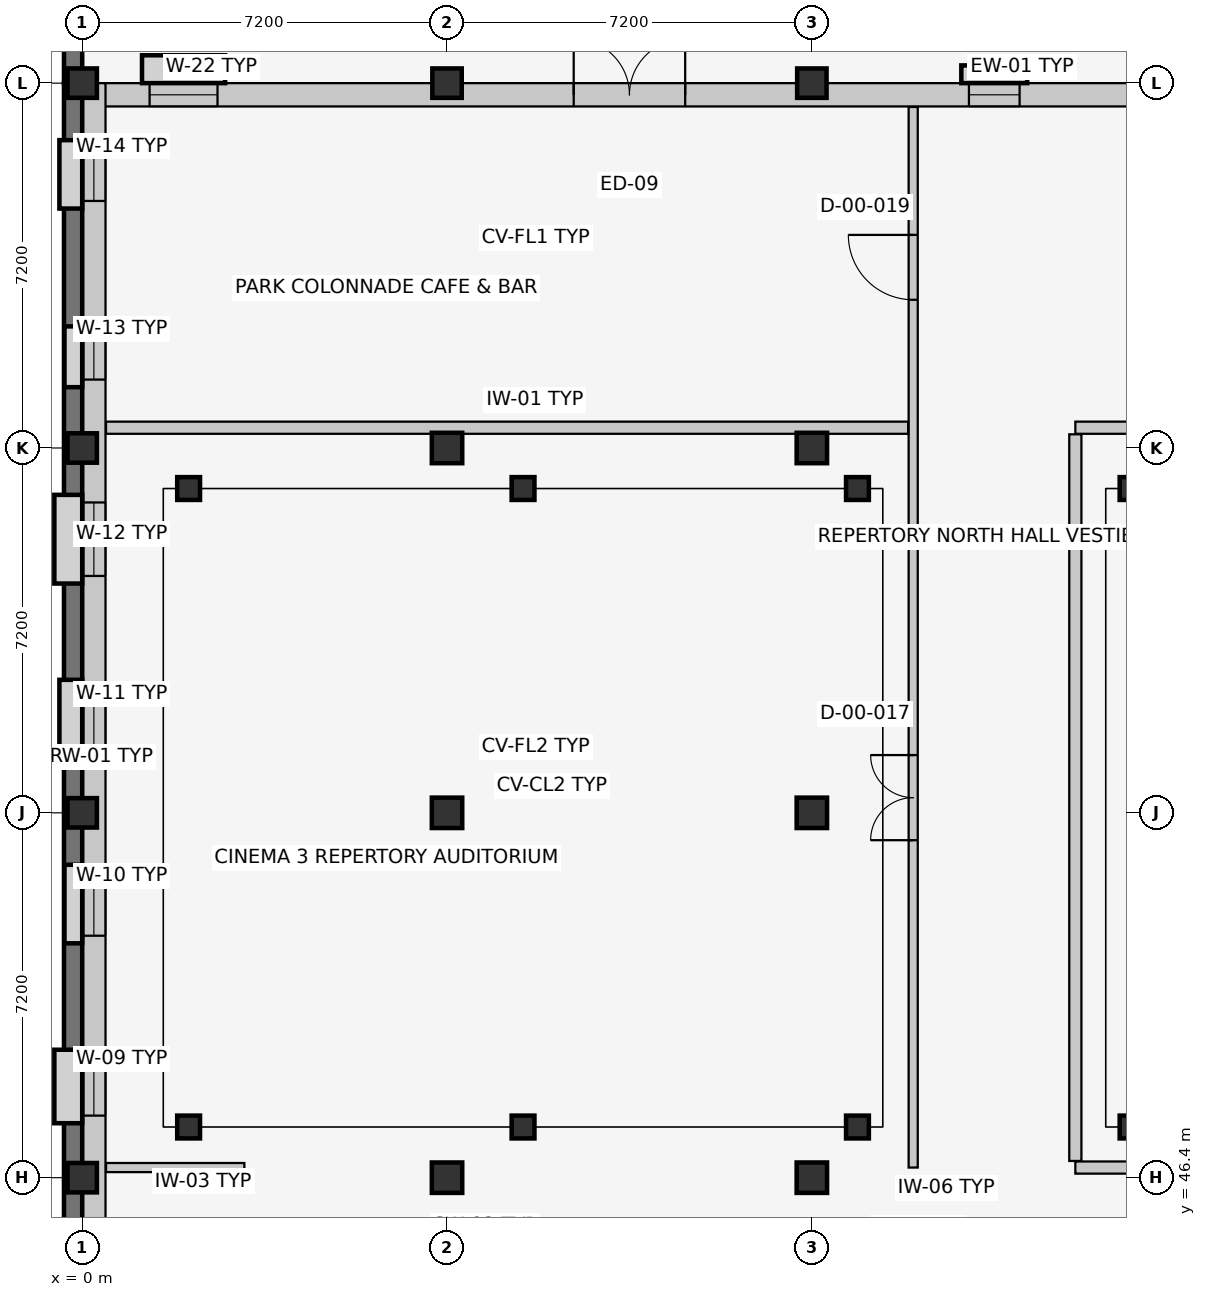
"""IFC4 building model, lengths in metres.
Left out: names, types, materials, properties, quantities, classifications, styles, units other than length and angle.
Written with IfcOpenShell. Run it as: python <this file> out.ifc"""

import sys

from ifc_helpers import new_model, si_unit, direction, frame, frame_2d, origin, origin_2d, place, context, subcontext, project, spatial, rectangle, extrude, element, fill, save


model = new_model("IFC4")
c1 = context("Model", 3, precision=1e-05, world=origin(), true_north=direction((0.0, 1.0)))
c2 = subcontext(c1, "Body", "Model", "MODEL_VIEW")
j1 = project(units=[si_unit("LENGTHUNIT", "METRE"), si_unit("PLANEANGLEUNIT", "RADIAN")], contexts=[c1])
p1 = place(None, origin())
s1 = spatial("IfcSite", under=j1, at=p1, CompositionType="ELEMENT")
p2 = place(p1, origin())
s2 = spatial("IfcBuilding", under=s1, at=p2, CompositionType="ELEMENT")
p3 = place(p2, origin())
s3 = spatial("IfcBuildingStorey", under=s2, at=p3, CompositionType="ELEMENT", Elevation=0.0)
for number, where, z_axis, x_axis in (
    (1, (0.0, 46.4, 0.0), (0.0, 0.0, 1.0), (1.0, 0.0, 0.0)),
    (2, (0.0, 53.6, 0.0), (0.0, 0.0, 1.0), (1.0, 0.0, 0.0)),
    (3, (0.0, 60.8, 0.0), (0.0, 0.0, 1.0), (1.0, 0.0, 0.0)),
    (4, (0.0, 68.0, 0.0), (0.0, 0.0, 1.0), (1.0, 0.0, 0.0)),
):
    element("IfcColumn", number, at=place(p3, frame(where, z_axis=z_axis, x_axis=x_axis)), inside=s3, PredefinedType="COLUMN", context=c2, shape_type="SweptSolid", body=[
        extrude(rectangle(XDim=0.58, YDim=0.58, at=origin_2d()), origin(), (0.0, 0.0, 1.0), 5.4),
    ])
for number, where, z_axis, x_axis in (
    (5, (7.2, 46.4, 0.0), (0.0, 0.0, 1.0), (1.0, 0.0, 0.0)),
    (6, (7.2, 53.6, 0.0), (0.0, 0.0, 1.0), (1.0, 0.0, 0.0)),
    (7, (7.2, 60.8, 0.0), (0.0, 0.0, 1.0), (1.0, 0.0, 0.0)),
):
    element("IfcColumn", number, at=place(p3, frame(where, z_axis=z_axis, x_axis=x_axis)), inside=s3, PredefinedType="COLUMN", context=c2, shape_type="SweptSolid", body=[
        extrude(rectangle(XDim=0.6, YDim=0.6, at=origin_2d()), origin(), (0.0, 0.0, 1.0), 5.4),
    ])
p4 = place(p3, frame((7.2, 68.0, 0.0), z_axis=(0.0, 0.0, 1.0), x_axis=(1.0, 0.0, 0.0)))
e8 = element("IfcColumn", 8, at=p4, inside=s3, PredefinedType="COLUMN", context=c2, shape_type="SweptSolid", body=[
    extrude(rectangle(XDim=0.58, YDim=0.58, at=origin_2d()), origin(), (0.0, 0.0, 1.0), 5.4),
])
for number, where, z_axis, x_axis in (
    (9, (14.4, 46.4, 0.0), (0.0, 0.0, 1.0), (1.0, 0.0, 0.0)),
    (10, (14.4, 53.6, 0.0), (0.0, 0.0, 1.0), (1.0, 0.0, 0.0)),
    (11, (14.4, 60.8, 0.0), (0.0, 0.0, 1.0), (1.0, 0.0, 0.0)),
):
    element("IfcColumn", number, at=place(p3, frame(where, z_axis=z_axis, x_axis=x_axis)), inside=s3, PredefinedType="COLUMN", context=c2, shape_type="SweptSolid", body=[
        extrude(rectangle(XDim=0.6, YDim=0.6, at=origin_2d()), origin(), (0.0, 0.0, 1.0), 5.4),
    ])
p5 = place(p3, frame((14.4, 68.0, 0.0), z_axis=(0.0, 0.0, 1.0), x_axis=(1.0, 0.0, 0.0)))
e12 = element("IfcColumn", 12, at=p5, inside=s3, PredefinedType="COLUMN", context=c2, shape_type="SweptSolid", body=[
    extrude(rectangle(XDim=0.58, YDim=0.58, at=origin_2d()), origin(), (0.0, 0.0, 1.0), 5.4),
])
p6 = place(p3, frame((2.1, 47.4, -0.55), z_axis=(0.0, 0.0, 1.0), x_axis=(1.0, 0.0, 0.0)))
e13 = element("IfcColumn", 13, at=p6, inside=s3, PredefinedType="COLUMN", context=c2, shape_type="SweptSolid", body=[
    extrude(rectangle(XDim=0.45, YDim=0.45, at=origin_2d()), origin(), (0.0, 0.0, 1.0), 0.955),
])
p7 = place(p3, frame((2.1, 60.0, -0.55), z_axis=(0.0, 0.0, 1.0), x_axis=(1.0, 0.0, 0.0)))
e14 = element("IfcColumn", 14, at=p7, inside=s3, PredefinedType="COLUMN", context=c2, shape_type="SweptSolid", body=[
    extrude(rectangle(XDim=0.45, YDim=0.45, at=origin_2d()), origin(), (0.0, 0.0, 1.0), 3.625),
])
p8 = place(p3, frame((8.7, 47.4, -0.55), z_axis=(0.0, 0.0, 1.0), x_axis=(1.0, 0.0, 0.0)))
e15 = element("IfcColumn", 15, at=p8, inside=s3, PredefinedType="COLUMN", context=c2, shape_type="SweptSolid", body=[
    extrude(rectangle(XDim=0.45, YDim=0.45, at=origin_2d()), origin(), (0.0, 0.0, 1.0), 0.955),
])
p9 = place(p3, frame((8.7, 60.0, -0.55), z_axis=(0.0, 0.0, 1.0), x_axis=(1.0, 0.0, 0.0)))
e16 = element("IfcColumn", 16, at=p9, inside=s3, PredefinedType="COLUMN", context=c2, shape_type="SweptSolid", body=[
    extrude(rectangle(XDim=0.45, YDim=0.45, at=origin_2d()), origin(), (0.0, 0.0, 1.0), 3.625),
])
p10 = place(p3, frame((15.3, 47.4, -0.55), z_axis=(0.0, 0.0, 1.0), x_axis=(1.0, 0.0, 0.0)))
e17 = element("IfcColumn", 17, at=p10, inside=s3, PredefinedType="COLUMN", context=c2, shape_type="SweptSolid", body=[
    extrude(rectangle(XDim=0.45, YDim=0.45, at=origin_2d()), origin(), (0.0, 0.0, 1.0), 0.955),
])
p11 = place(p3, frame((15.3, 60.0, -0.55), z_axis=(0.0, 0.0, 1.0), x_axis=(1.0, 0.0, 0.0)))
e18 = element("IfcColumn", 18, at=p11, inside=s3, PredefinedType="COLUMN", context=c2, shape_type="SweptSolid", body=[
    extrude(rectangle(XDim=0.45, YDim=0.45, at=origin_2d()), origin(), (0.0, 0.0, 1.0), 3.625),
])
p12 = place(p3, frame((20.7, 47.4, -0.55), z_axis=(0.0, 0.0, 1.0), x_axis=(1.0, 0.0, 0.0)))
e19 = element("IfcColumn", 19, at=p12, inside=s3, PredefinedType="COLUMN", context=c2, shape_type="SweptSolid", body=[
    extrude(rectangle(XDim=0.45, YDim=0.45, at=origin_2d()), origin(), (0.0, 0.0, 1.0), 0.975),
])
p13 = place(p3, frame((20.7, 60.0, -0.55), z_axis=(0.0, 0.0, 1.0), x_axis=(1.0, 0.0, 0.0)))
e20 = element("IfcColumn", 20, at=p13, inside=s3, PredefinedType="COLUMN", context=c2, shape_type="SweptSolid", body=[
    extrude(rectangle(XDim=0.45, YDim=0.45, at=origin_2d()), origin(), (0.0, 0.0, 1.0), 3.645),
])
p14 = place(p3, frame((0.0, 67.77, 0.0), z_axis=(0.0, 0.0, 1.0), x_axis=(1.0, 0.0, 0.0)))
e21 = element("IfcWall", 21, at=p14, inside=s3, PredefinedType="SOLIDWALL", context=c2, shape_type="SweptSolid", body=[
    extrude(rectangle(XDim=36.0, YDim=0.46, at=frame_2d((18.0, 0.0))), origin(), (0.0, 0.0, 1.0), 4.435),
])
p15 = place(p14, frame((9.7, 0.0, 0.0)))
e22 = element("IfcOpeningElement", 22, at=p15, cuts=e21, PredefinedType="OPENING", context=c2, shape_type="SweptSolid", body=[
    extrude(rectangle(XDim=2.2, YDim=2.4, at=frame_2d((1.1, 1.2))), frame((0.0, 0.242, 0.0), z_axis=(0.0, -1.0, 0.0), x_axis=(1.0, 0.0, 0.0)), (0.0, 0.0, 1.0), 0.484),
])
p16 = place(p14, frame((24.2, 0.0, 0.0)))
e23 = element("IfcOpeningElement", 23, at=p16, cuts=e21, PredefinedType="OPENING", context=c2, shape_type="SweptSolid", body=[
    extrude(rectangle(XDim=2.0, YDim=2.35, at=frame_2d((1.0, 1.175))), frame((0.0, 0.242, 0.0), z_axis=(0.0, -1.0, 0.0), x_axis=(1.0, 0.0, 0.0)), (0.0, 0.0, 1.0), 0.484),
])
p17 = place(p14, frame((1.33, 0.0, 0.9)))
e24 = element("IfcOpeningElement", 24, at=p17, cuts=e21, PredefinedType="OPENING", context=c2, shape_type="SweptSolid", body=[
    extrude(rectangle(XDim=1.34, YDim=1.75, at=frame_2d((0.67, 0.875))), frame((0.0, 0.242, 0.0), z_axis=(0.0, -1.0, 0.0), x_axis=(1.0, 0.0, 0.0)), (0.0, 0.0, 1.0), 0.484),
])
p18 = place(p14, frame((17.5, 0.0, 0.9)))
e25 = element("IfcOpeningElement", 25, at=p18, cuts=e21, PredefinedType="OPENING", context=c2, shape_type="SweptSolid", body=[
    extrude(rectangle(XDim=1.0, YDim=1.35, at=frame_2d((0.5, 0.675))), frame((0.0, 0.242, 0.0), z_axis=(0.0, -1.0, 0.0), x_axis=(1.0, 0.0, 0.0)), (0.0, 0.0, 1.0), 0.484),
])
p19 = place(p14, frame((33.3, 0.0, 0.9)))
e26 = element("IfcOpeningElement", 26, at=p19, cuts=e21, PredefinedType="OPENING", context=c2, shape_type="SweptSolid", body=[
    extrude(rectangle(XDim=1.4, YDim=1.35, at=frame_2d((0.7, 0.675))), frame((0.0, 0.242, 0.0), z_axis=(0.0, -1.0, 0.0), x_axis=(1.0, 0.0, 0.0)), (0.0, 0.0, 1.0), 0.484),
])
p20 = place(p3, frame((0.23, 39.2, 0.0), z_axis=(0.0, 0.0, 1.0), x_axis=(0.0, 1.0, 0.0)))
e27 = element("IfcWall", 27, at=p20, inside=s3, PredefinedType="SOLIDWALL", context=c2, shape_type="SweptSolid", body=[
    extrude(rectangle(XDim=28.8, YDim=0.46, at=frame_2d((14.4, 0.0))), origin(), (0.0, 0.0, 1.0), 4.535),
])
p21 = place(p20, frame((2.7, 0.0, 0.0)))
e28 = element("IfcOpeningElement", 28, at=p21, cuts=e27, PredefinedType="OPENING", context=c2, shape_type="SweptSolid", body=[
    extrude(rectangle(XDim=1.8, YDim=2.3, at=frame_2d((0.9, 1.15))), frame((0.0, 0.242, 0.0), z_axis=(0.0, -1.0, 0.0), x_axis=(1.0, 0.0, 0.0)), (0.0, 0.0, 1.0), 0.484),
])
p22 = place(p20, frame((8.425, 0.0, 0.9)))
e29 = element("IfcOpeningElement", 29, at=p22, cuts=e27, PredefinedType="OPENING", context=c2, shape_type="SweptSolid", body=[
    extrude(rectangle(XDim=1.15, YDim=1.45, at=frame_2d((0.575, 0.725))), frame((0.0, 0.242, 0.0), z_axis=(0.0, -1.0, 0.0), x_axis=(1.0, 0.0, 0.0)), (0.0, 0.0, 1.0), 0.484),
])
p23 = place(p20, frame((11.975, 0.0, 0.9)))
e30 = element("IfcOpeningElement", 30, at=p23, cuts=e27, PredefinedType="OPENING", context=c2, shape_type="SweptSolid", body=[
    extrude(rectangle(XDim=1.25, YDim=1.45, at=frame_2d((0.625, 0.725))), frame((0.0, 0.242, 0.0), z_axis=(0.0, -1.0, 0.0), x_axis=(1.0, 0.0, 0.0)), (0.0, 0.0, 1.0), 0.484),
])
p24 = place(p20, frame((15.525, 0.0, 0.9)))
e31 = element("IfcOpeningElement", 31, at=p24, cuts=e27, PredefinedType="OPENING", context=c2, shape_type="SweptSolid", body=[
    extrude(rectangle(XDim=1.35, YDim=1.45, at=frame_2d((0.675, 0.725))), frame((0.0, 0.242, 0.0), z_axis=(0.0, -1.0, 0.0), x_axis=(1.0, 0.0, 0.0)), (0.0, 0.0, 1.0), 0.484),
])
p25 = place(p20, frame((19.075, 0.0, 0.9)))
e32 = element("IfcOpeningElement", 32, at=p25, cuts=e27, PredefinedType="OPENING", context=c2, shape_type="SweptSolid", body=[
    extrude(rectangle(XDim=1.45, YDim=1.45, at=frame_2d((0.725, 0.725))), frame((0.0, 0.242, 0.0), z_axis=(0.0, -1.0, 0.0), x_axis=(1.0, 0.0, 0.0)), (0.0, 0.0, 1.0), 0.484),
])
p26 = place(p20, frame((22.95, 0.0, 0.9)))
e33 = element("IfcOpeningElement", 33, at=p26, cuts=e27, PredefinedType="OPENING", context=c2, shape_type="SweptSolid", body=[
    extrude(rectangle(XDim=0.9, YDim=1.6, at=frame_2d((0.45, 0.8))), frame((0.0, 0.242, 0.0), z_axis=(0.0, -1.0, 0.0), x_axis=(1.0, 0.0, 0.0)), (0.0, 0.0, 1.0), 0.484),
])
p27 = place(p20, frame((26.475, 0.0, 0.9)))
e34 = element("IfcOpeningElement", 34, at=p27, cuts=e27, PredefinedType="OPENING", context=c2, shape_type="SweptSolid", body=[
    extrude(rectangle(XDim=1.05, YDim=1.6, at=frame_2d((0.525, 0.8))), frame((0.0, 0.242, 0.0), z_axis=(0.0, -1.0, 0.0), x_axis=(1.0, 0.0, 0.0)), (0.0, 0.0, 1.0), 0.484),
])
p28 = place(p3, frame((-0.18, 39.4, -0.8), z_axis=(0.0, 0.0, 1.0), x_axis=(0.0, 1.0, 0.0)))
e35 = element("IfcWall", 35, at=p28, inside=s3, PredefinedType="USERDEFINED", context=c2, shape_type="SweptSolid", body=[
    extrude(rectangle(XDim=28.6, YDim=0.36, at=frame_2d((14.3, 0.0))), origin(), (0.0, 0.0, 1.0), 1.3),
])
p29 = place(p3, frame((-0.18, 68.0, -0.8), z_axis=(0.0, 0.0, 1.0), x_axis=(0.0, 1.0, 0.0)))
e36 = element("IfcWall", 36, at=p29, inside=s3, PredefinedType="USERDEFINED", context=c2, shape_type="SweptSolid", body=[
    extrude(rectangle(XDim=43.8, YDim=0.36, at=frame_2d((21.9, 0.0))), origin(), (0.0, 0.0, 1.0), 1.3),
])
p30 = place(p3, frame((0.47, 46.6, 0.0), z_axis=(0.0, 0.0, 1.0), x_axis=(1.0, 0.0, 0.0)))
e37 = element("IfcWall", 37, at=p30, inside=s3, PredefinedType="PARTITIONING", context=c2, shape_type="SweptSolid", body=[
    extrude(rectangle(XDim=2.73, YDim=0.18, at=frame_2d((1.365, 0.0))), origin(), (0.0, 0.0, 1.0), 4.465),
])
p31 = place(p3, frame((16.4, 46.6, 0.0), z_axis=(0.0, 0.0, 1.0), x_axis=(0.0, 1.0, 0.0)))
e38 = element("IfcWall", 38, at=p31, inside=s3, PredefinedType="PARTITIONING", context=c2, shape_type="SweptSolid", body=[
    extrude(rectangle(XDim=20.93, YDim=0.18, at=frame_2d((10.465, 0.0))), origin(), (0.0, 0.0, 1.0), 5.14),
])
p32 = place(p31, frame((6.46, 0.0, 0.0)))
e39 = element("IfcOpeningElement", 39, at=p32, cuts=e38, PredefinedType="OPENING", context=c2, shape_type="SweptSolid", body=[
    extrude(rectangle(XDim=1.68, YDim=2.3, at=frame_2d((0.84, 1.15))), frame((0.0, 0.102, 0.0), z_axis=(0.0, -1.0, 0.0), x_axis=(1.0, 0.0, 0.0)), (0.0, 0.0, 1.0), 0.204),
])
p33 = place(p31, frame((17.125, 0.0, 0.0)))
e40 = element("IfcOpeningElement", 40, at=p33, cuts=e38, PredefinedType="OPENING", context=c2, shape_type="SweptSolid", body=[
    extrude(rectangle(XDim=1.28, YDim=2.2, at=frame_2d((0.64, 1.1))), frame((0.0, 0.102, 0.0), z_axis=(0.0, -1.0, 0.0), x_axis=(1.0, 0.0, 0.0)), (0.0, 0.0, 1.0), 0.204),
])
p34 = place(p3, frame((0.47, 61.2, 0.0), z_axis=(0.0, 0.0, 1.0), x_axis=(1.0, 0.0, 0.0)))
e41 = element("IfcWall", 41, at=p34, inside=s3, PredefinedType="PARTITIONING", context=c2, shape_type="SweptSolid", body=[
    extrude(rectangle(XDim=15.83, YDim=0.24, at=frame_2d((7.915, 0.0))), origin(), (0.0, 0.0, 1.0), 5.14),
])
p35 = place(p3, frame((19.6, 46.6, 0.0), z_axis=(0.0, 0.0, 1.0), x_axis=(1.0, 0.0, 0.0)))
e42 = element("IfcWall", 42, at=p35, inside=s3, PredefinedType="PARTITIONING", context=c2, shape_type="SweptSolid", body=[
    extrude(rectangle(XDim=15.985, YDim=0.24, at=frame_2d((7.992, 0.0))), origin(), (0.0, 0.0, 1.0), 4.265),
])
p36 = place(p35, frame((4.327, 0.0, 0.0)))
e43 = element("IfcOpeningElement", 43, at=p36, cuts=e42, PredefinedType="OPENING", context=c2, shape_type="SweptSolid", body=[
    extrude(rectangle(XDim=1.56, YDim=2.25, at=frame_2d((0.78, 1.125))), frame((0.0, 0.132, 0.0), z_axis=(0.0, -1.0, 0.0), x_axis=(1.0, 0.0, 0.0)), (0.0, 0.0, 1.0), 0.264),
])
p37 = place(p3, frame((19.6, 61.2, 0.0), z_axis=(0.0, 0.0, 1.0), x_axis=(1.0, 0.0, 0.0)))
e44 = element("IfcWall", 44, at=p37, inside=s3, PredefinedType="PARTITIONING", context=c2, shape_type="SweptSolid", body=[
    extrude(rectangle(XDim=15.985, YDim=0.24, at=frame_2d((7.992, 0.0))), origin(), (0.0, 0.0, 1.0), 4.265),
])
p38 = place(p3, frame((19.6, 46.73, 0.0), z_axis=(0.0, 0.0, 1.0), x_axis=(0.0, 1.0, 0.0)))
e45 = element("IfcWall", 45, at=p38, inside=s3, PredefinedType="PARTITIONING", context=c2, shape_type="SweptSolid", body=[
    extrude(rectangle(XDim=14.34, YDim=0.24, at=frame_2d((7.17, 0.0))), origin(), (0.0, 0.0, 1.0), 5.14),
])
p39 = place(p15, origin())
e46 = element("IfcDoor", 46, at=p39, inside=s3, OperationType="DOUBLE_DOOR_SINGLE_SWING", PredefinedType="DOOR", context=c2, shape_type="SweptSolid", body=[
    extrude(rectangle(XDim=2.2, YDim=2.4, at=frame_2d((1.1, 1.2))), frame((0.0, 0.025, 0.0), z_axis=(0.0, -1.0, 0.0), x_axis=(1.0, 0.0, 0.0)), (0.0, 0.0, 1.0), 0.05),
])
fill(e22, e46)
p40 = place(p17, origin())
e47 = element("IfcWindow", 47, at=p40, inside=s3, PartitioningType="SINGLE_PANEL", PredefinedType="WINDOW", context=c2, shape_type="SweptSolid", body=[
    extrude(rectangle(XDim=1.34, YDim=1.75, at=frame_2d((0.67, 0.875))), frame((0.0, 0.03, 0.0), z_axis=(0.0, -1.0, 0.0), x_axis=(1.0, 0.0, 0.0)), (0.0, 0.0, 1.0), 0.06),
])
fill(e24, e47)
p41 = place(p18, origin())
e48 = element("IfcWindow", 48, at=p41, inside=s3, PartitioningType="SINGLE_PANEL", PredefinedType="WINDOW", context=c2, shape_type="SweptSolid", body=[
    extrude(rectangle(XDim=1.0, YDim=1.35, at=frame_2d((0.5, 0.675))), frame((0.0, 0.03, 0.0), z_axis=(0.0, -1.0, 0.0), x_axis=(1.0, 0.0, 0.0)), (0.0, 0.0, 1.0), 0.06),
])
fill(e25, e48)
p42 = place(p22, origin())
e49 = element("IfcWindow", 49, at=p42, inside=s3, PartitioningType="SINGLE_PANEL", PredefinedType="WINDOW", context=c2, shape_type="SweptSolid", body=[
    extrude(rectangle(XDim=1.15, YDim=1.45, at=frame_2d((0.575, 0.725))), frame((0.0, 0.03, 0.0), z_axis=(0.0, -1.0, 0.0), x_axis=(1.0, 0.0, 0.0)), (0.0, 0.0, 1.0), 0.06),
])
fill(e29, e49)
p43 = place(p23, origin())
e50 = element("IfcWindow", 50, at=p43, inside=s3, PartitioningType="SINGLE_PANEL", PredefinedType="WINDOW", context=c2, shape_type="SweptSolid", body=[
    extrude(rectangle(XDim=1.25, YDim=1.45, at=frame_2d((0.625, 0.725))), frame((0.0, 0.03, 0.0), z_axis=(0.0, -1.0, 0.0), x_axis=(1.0, 0.0, 0.0)), (0.0, 0.0, 1.0), 0.06),
])
fill(e30, e50)
p44 = place(p24, origin())
e51 = element("IfcWindow", 51, at=p44, inside=s3, PartitioningType="SINGLE_PANEL", PredefinedType="WINDOW", context=c2, shape_type="SweptSolid", body=[
    extrude(rectangle(XDim=1.35, YDim=1.45, at=frame_2d((0.675, 0.725))), frame((0.0, 0.03, 0.0), z_axis=(0.0, -1.0, 0.0), x_axis=(1.0, 0.0, 0.0)), (0.0, 0.0, 1.0), 0.06),
])
fill(e31, e51)
p45 = place(p25, origin())
e52 = element("IfcWindow", 52, at=p45, inside=s3, PartitioningType="SINGLE_PANEL", PredefinedType="WINDOW", context=c2, shape_type="SweptSolid", body=[
    extrude(rectangle(XDim=1.45, YDim=1.45, at=frame_2d((0.725, 0.725))), frame((0.0, 0.03, 0.0), z_axis=(0.0, -1.0, 0.0), x_axis=(1.0, 0.0, 0.0)), (0.0, 0.0, 1.0), 0.06),
])
fill(e32, e52)
p46 = place(p26, origin())
e53 = element("IfcWindow", 53, at=p46, inside=s3, PartitioningType="SINGLE_PANEL", PredefinedType="WINDOW", context=c2, shape_type="SweptSolid", body=[
    extrude(rectangle(XDim=0.9, YDim=1.6, at=frame_2d((0.45, 0.8))), frame((0.0, 0.03, 0.0), z_axis=(0.0, -1.0, 0.0), x_axis=(1.0, 0.0, 0.0)), (0.0, 0.0, 1.0), 0.06),
])
fill(e33, e53)
p47 = place(p27, origin())
e54 = element("IfcWindow", 54, at=p47, inside=s3, PartitioningType="SINGLE_PANEL", PredefinedType="WINDOW", context=c2, shape_type="SweptSolid", body=[
    extrude(rectangle(XDim=1.05, YDim=1.6, at=frame_2d((0.525, 0.8))), frame((0.0, 0.03, 0.0), z_axis=(0.0, -1.0, 0.0), x_axis=(1.0, 0.0, 0.0)), (0.0, 0.0, 1.0), 0.06),
])
fill(e34, e54)
p48 = place(p32, origin())
e55 = element("IfcDoor", 55, at=p48, inside=s3, OperationType="DOUBLE_DOOR_SINGLE_SWING", PredefinedType="DOOR", context=c2, shape_type="SweptSolid", body=[
    extrude(rectangle(XDim=1.68, YDim=2.3, at=frame_2d((0.84, 1.15))), frame((0.0, 0.025, 0.0), z_axis=(0.0, -1.0, 0.0), x_axis=(1.0, 0.0, 0.0)), (0.0, 0.0, 1.0), 0.05),
])
fill(e39, e55)
p49 = place(p33, origin())
e56 = element("IfcDoor", 56, at=p49, inside=s3, OperationType="SINGLE_SWING_RIGHT", PredefinedType="DOOR", context=c2, shape_type="SweptSolid", body=[
    extrude(rectangle(XDim=1.28, YDim=2.2, at=frame_2d((0.64, 1.1))), frame((0.0, 0.025, 0.0), z_axis=(0.0, -1.0, 0.0), x_axis=(1.0, 0.0, 0.0)), (0.0, 0.0, 1.0), 0.05),
])
fill(e40, e56)
save(model, sys.argv[1])
